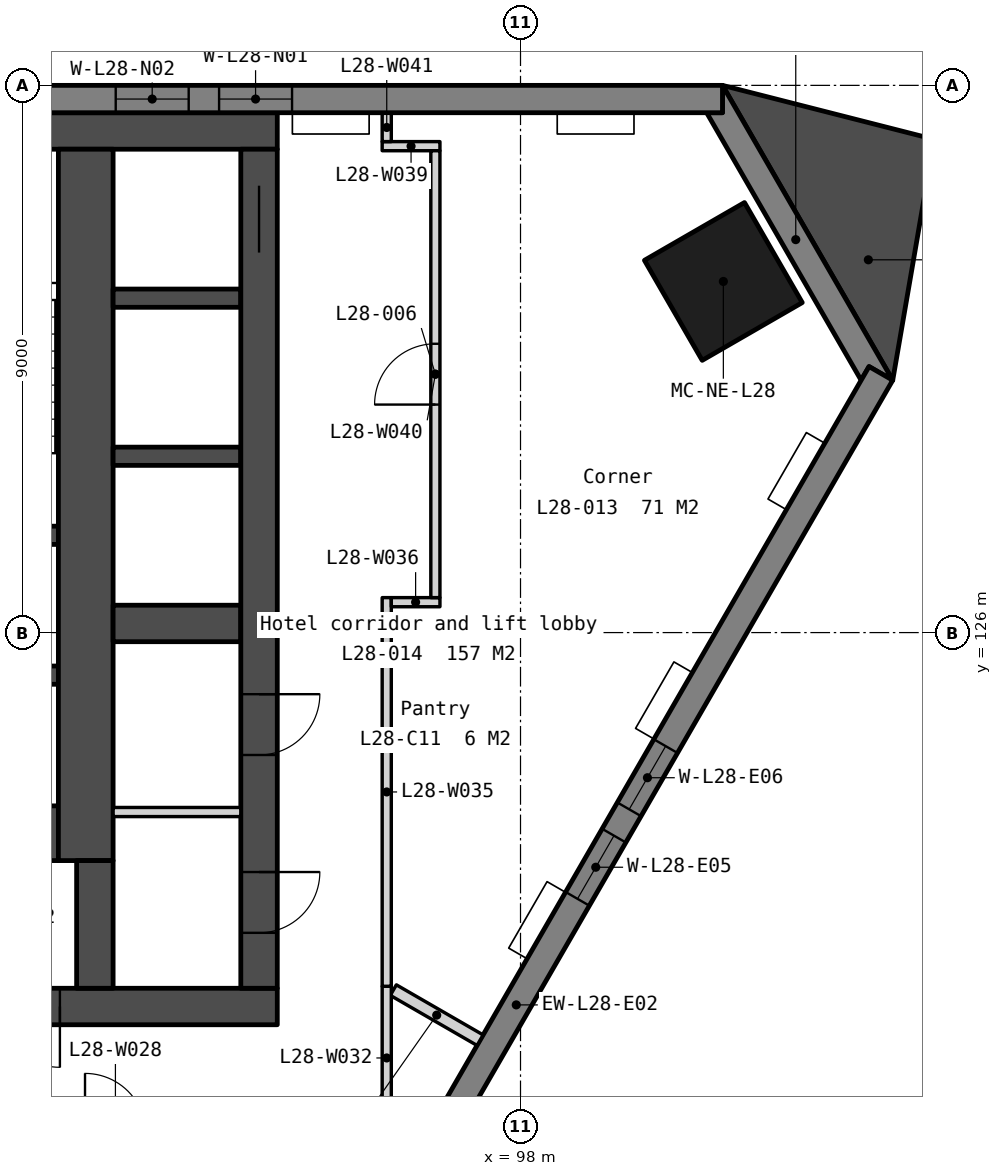
"""IFC4 building model, lengths in metres.
Left out: names, types, materials, properties, quantities, classifications, styles, units other than length and angle.
Written with IfcOpenShell. Run it as: python <this file> out.ifc"""

import sys

from ifc_helpers import new_model, si_unit, direction, frame, frame_2d, origin, origin_2d, place, context, subcontext, project, spatial, polyline, rectangle, outline, extrude, element, fill, save


model = new_model("IFC4")
c1 = context("Model", 3, precision=1e-05, world=origin(), true_north=direction((0.0, 1.0)))
c2 = subcontext(c1, "Body", "Model", "MODEL_VIEW")
j1 = project(units=[si_unit("LENGTHUNIT", "METRE"), si_unit("PLANEANGLEUNIT", "RADIAN")], contexts=[c1])
p1 = place(None, origin())
s1 = spatial("IfcSite", under=j1, at=p1, CompositionType="ELEMENT")
p2 = place(p1, origin())
s2 = spatial("IfcBuilding", under=s1, at=p2, CompositionType="ELEMENT")
p3 = place(p2, frame((0.0, 0.0, 113.3)))
s3 = spatial("IfcBuildingStorey", under=s2, at=p3, CompositionType="ELEMENT", Elevation=113.3)
p4 = place(p3, frame((101.336, 131.775, 0.0), z_axis=(0.0, 0.0, 1.0), x_axis=(-0.5, 0.866025403784, 0.0)))
e1 = element("IfcColumn", 1, at=p4, inside=s3, PredefinedType="COLUMN", context=c2, shape_type="SweptSolid", body=[
    extrude(rectangle(XDim=1.9, YDim=1.9, at=origin_2d()), origin(), (0.0, 0.0, 1.0), 3.5),
])
p5 = place(p3, frame((66.0, 134.25, 0.0), z_axis=(0.0, 0.0, 1.0), x_axis=(1.0, 0.0, 0.0)))
e2 = element("IfcWall", 2, at=p5, inside=s3, PredefinedType="SOLIDWALL", context=c2, shape_type="SweptSolid", body=[
    extrude(rectangle(XDim=28.0, YDim=0.6, at=frame_2d((14.0, 0.0))), origin(), (0.0, 0.0, 1.0), 3.35),
])
p6 = place(p3, frame((66.0, 119.85, 0.0), z_axis=(0.0, 0.0, 1.0), x_axis=(1.0, 0.0, 0.0)))
e3 = element("IfcWall", 3, at=p6, inside=s3, PredefinedType="SOLIDWALL", context=c2, shape_type="SweptSolid", body=[
    extrude(rectangle(XDim=28.0, YDim=0.6, at=frame_2d((14.0, 0.0))), origin(), (0.0, 0.0, 1.0), 3.35),
])
p7 = place(p6, frame((6.825, 0.0, 0.0)))
e4 = element("IfcOpeningElement", 4, at=p7, cuts=e3, PredefinedType="OPENING", context=c2, shape_type="SweptSolid", body=[
    extrude(rectangle(XDim=1.8, YDim=2.1, at=frame_2d((0.9, 1.05))), frame((0.0, 0.31, 0.0), z_axis=(0.0, -1.0, 0.0), x_axis=(1.0, 0.0, 0.0)), (0.0, 0.0, 1.0), 0.62),
])
p8 = place(p6, frame((15.85, 0.0, 0.0)))
e5 = element("IfcOpeningElement", 5, at=p8, cuts=e3, PredefinedType="OPENING", context=c2, shape_type="SweptSolid", body=[
    extrude(rectangle(XDim=1.5, YDim=2.1, at=frame_2d((0.75, 1.05))), frame((0.0, 0.31, 0.0), z_axis=(0.0, -1.0, 0.0), x_axis=(1.0, 0.0, 0.0)), (0.0, 0.0, 1.0), 0.62),
])
p9 = place(p6, frame((19.375, 0.0, 0.0)))
e6 = element("IfcOpeningElement", 6, at=p9, cuts=e3, PredefinedType="OPENING", context=c2, shape_type="SweptSolid", body=[
    extrude(rectangle(XDim=1.8, YDim=2.1, at=frame_2d((0.9, 1.05))), frame((0.0, 0.31, 0.0), z_axis=(0.0, -1.0, 0.0), x_axis=(1.0, 0.0, 0.0)), (0.0, 0.0, 1.0), 0.62),
])
p10 = place(p6, frame((4.425, 0.0, 0.0)))
e7 = element("IfcOpeningElement", 7, at=p10, cuts=e3, PredefinedType="OPENING", context=c2, shape_type="SweptSolid", body=[
    extrude(rectangle(XDim=1.0, YDim=2.1, at=frame_2d((0.5, 1.05))), frame((0.0, 0.31, 0.0), z_axis=(0.0, -1.0, 0.0), x_axis=(1.0, 0.0, 0.0)), (0.0, 0.0, 1.0), 0.62),
])
p11 = place(p6, frame((9.783, 0.0, 0.0)))
e8 = element("IfcOpeningElement", 8, at=p11, cuts=e3, PredefinedType="OPENING", context=c2, shape_type="SweptSolid", body=[
    extrude(rectangle(XDim=1.0, YDim=2.1, at=frame_2d((0.5, 1.05))), frame((0.0, 0.31, 0.0), z_axis=(0.0, -1.0, 0.0), x_axis=(1.0, 0.0, 0.0)), (0.0, 0.0, 1.0), 0.62),
])
p12 = place(p6, frame((11.525, 0.0, 0.0)))
e9 = element("IfcOpeningElement", 9, at=p12, cuts=e3, PredefinedType="OPENING", context=c2, shape_type="SweptSolid", body=[
    extrude(rectangle(XDim=1.0, YDim=2.1, at=frame_2d((0.5, 1.05))), frame((0.0, 0.31, 0.0), z_axis=(0.0, -1.0, 0.0), x_axis=(1.0, 0.0, 0.0)), (0.0, 0.0, 1.0), 0.62),
])
p13 = place(p6, frame((13.658, 0.0, 0.0)))
e10 = element("IfcOpeningElement", 10, at=p13, cuts=e3, PredefinedType="OPENING", context=c2, shape_type="SweptSolid", body=[
    extrude(rectangle(XDim=1.0, YDim=2.1, at=frame_2d((0.5, 1.05))), frame((0.0, 0.31, 0.0), z_axis=(0.0, -1.0, 0.0), x_axis=(1.0, 0.0, 0.0)), (0.0, 0.0, 1.0), 0.62),
])
p14 = place(p6, frame((21.725, 0.0, 0.0)))
e11 = element("IfcOpeningElement", 11, at=p14, cuts=e3, PredefinedType="OPENING", context=c2, shape_type="SweptSolid", body=[
    extrude(rectangle(XDim=1.0, YDim=2.1, at=frame_2d((0.5, 1.05))), frame((0.0, 0.31, 0.0), z_axis=(0.0, -1.0, 0.0), x_axis=(1.0, 0.0, 0.0)), (0.0, 0.0, 1.0), 0.62),
])
p15 = place(p6, frame((23.425, 0.0, 0.0)))
e12 = element("IfcOpeningElement", 12, at=p15, cuts=e3, PredefinedType="OPENING", context=c2, shape_type="SweptSolid", body=[
    extrude(rectangle(XDim=1.0, YDim=2.1, at=frame_2d((0.5, 1.05))), frame((0.0, 0.31, 0.0), z_axis=(0.0, -1.0, 0.0), x_axis=(1.0, 0.0, 0.0)), (0.0, 0.0, 1.0), 0.62),
])
for number, where, z_axis, x_axis in (
    (13, (87.85, 127.6, 0.0), (0.0, 0.0, 1.0), (1.0, 0.0, 0.0)),
    (14, (87.85, 125.3, 0.0), (0.0, 0.0, 1.0), (1.0, 0.0, 0.0)),
):
    element("IfcWall", number, at=place(p3, frame(where, z_axis=z_axis, x_axis=x_axis)), inside=s3, PredefinedType="SOLIDWALL", context=c2, shape_type="SweptSolid", body=[
        extrude(rectangle(XDim=2.55, YDim=0.3, at=frame_2d((1.275, 0.0))), origin(), (0.0, 0.0, 1.0), 3.35),
    ])
p16 = place(p3, frame((87.85, 122.7, 0.0), z_axis=(0.0, 0.0, 1.0), x_axis=(1.0, 0.0, 0.0)))
e15 = element("IfcWall", 15, at=p16, inside=s3, PredefinedType="SOLIDWALL", context=c2, shape_type="SweptSolid", body=[
    extrude(rectangle(XDim=2.55, YDim=0.9, at=frame_2d((1.275, 0.0))), origin(), (0.0, 0.0, 1.0), 3.35),
])
p17 = place(p3, frame((90.85, 133.95, 0.0), z_axis=(0.0, 0.0, 1.0), x_axis=(0.0, -1.0, 0.0)))
e16 = element("IfcWall", 16, at=p17, inside=s3, PredefinedType="SOLIDWALL", context=c2, shape_type="SweptSolid", body=[
    extrude(rectangle(XDim=11.7, YDim=0.9, at=frame_2d((5.85, 0.0))), origin(), (0.0, 0.0, 1.0), 3.35),
])
p18 = place(p3, frame((91.0, 122.25, 0.0), z_axis=(0.0, 0.0, 1.0), x_axis=(0.0, -1.0, 0.0)))
e17 = element("IfcWall", 17, at=p18, inside=s3, PredefinedType="SOLIDWALL", context=c2, shape_type="SweptSolid", body=[
    extrude(rectangle(XDim=2.1, YDim=0.6, at=frame_2d((1.05, 0.0))), origin(), (0.0, 0.0, 1.0), 3.35),
])
for number, where, z_axis, x_axis in (
    (18, (91.3, 131.5, 0.0), (0.0, 0.0, 1.0), (1.0, 0.0, 0.0)),
    (19, (91.3, 128.9, 0.0), (0.0, 0.0, 1.0), (1.0, 0.0, 0.0)),
):
    element("IfcWall", number, at=place(p3, frame(where, z_axis=z_axis, x_axis=x_axis)), inside=s3, PredefinedType="SOLIDWALL", context=c2, shape_type="SweptSolid", body=[
        extrude(rectangle(XDim=2.1, YDim=0.3, at=frame_2d((1.05, 0.0))), origin(), (0.0, 0.0, 1.0), 3.35),
    ])
p19 = place(p3, frame((91.3, 126.15, 0.0), z_axis=(0.0, 0.0, 1.0), x_axis=(1.0, 0.0, 0.0)))
e20 = element("IfcWall", 20, at=p19, inside=s3, PredefinedType="SOLIDWALL", context=c2, shape_type="SweptSolid", body=[
    extrude(rectangle(XDim=2.1, YDim=0.6, at=frame_2d((1.05, 0.0))), origin(), (0.0, 0.0, 1.0), 3.35),
])
p20 = place(p3, frame((91.3, 123.049, 0.0), z_axis=(0.0, 0.0, 1.0), x_axis=(1.0, 0.0, 0.0)))
e21 = element("IfcWall", 21, at=p20, inside=s3, PredefinedType="PARTITIONING", context=c2, shape_type="SweptSolid", body=[
    extrude(rectangle(XDim=2.1, YDim=0.15, at=frame_2d((1.05, 0.0))), origin(), (0.0, 0.0, 1.0), 3.35),
])
p21 = place(p3, frame((93.7, 133.95, 0.0), z_axis=(0.0, 0.0, 1.0), x_axis=(0.0, -1.0, 0.0)))
e22 = element("IfcWall", 22, at=p21, inside=s3, PredefinedType="SOLIDWALL", context=c2, shape_type="SweptSolid", body=[
    extrude(rectangle(XDim=13.8, YDim=0.6, at=frame_2d((6.9, 0.0))), origin(), (0.0, 0.0, 1.0), 3.35),
])
p22 = place(p21, frame((0.6, 0.0, 0.0)))
e23 = element("IfcOpeningElement", 23, at=p22, cuts=e22, PredefinedType="OPENING", context=c2, shape_type="SweptSolid", body=[
    extrude(rectangle(XDim=1.1, YDim=2.1, at=frame_2d((0.55, 1.05))), frame((0.0, 0.31, 0.0), z_axis=(0.0, -1.0, 0.0), x_axis=(1.0, 0.0, 0.0)), (0.0, 0.0, 1.0), 0.62),
])
p23 = place(p21, frame((8.963, 0.0, 0.0)))
e24 = element("IfcOpeningElement", 24, at=p23, cuts=e22, PredefinedType="OPENING", context=c2, shape_type="SweptSolid", body=[
    extrude(rectangle(XDim=1.0, YDim=2.1, at=frame_2d((0.5, 1.05))), frame((0.0, 0.31, 0.0), z_axis=(0.0, -1.0, 0.0), x_axis=(1.0, 0.0, 0.0)), (0.0, 0.0, 1.0), 0.62),
])
p24 = place(p21, frame((11.888, 0.0, 0.0)))
e25 = element("IfcOpeningElement", 25, at=p24, cuts=e22, PredefinedType="OPENING", context=c2, shape_type="SweptSolid", body=[
    extrude(rectangle(XDim=1.0, YDim=2.1, at=frame_2d((0.5, 1.05))), frame((0.0, 0.31, 0.0), z_axis=(0.0, -1.0, 0.0), x_axis=(1.0, 0.0, 0.0)), (0.0, 0.0, 1.0), 0.62),
])
p25 = place(p3, frame((0.0, 0.0, -0.15)))
e26 = element("IfcWall", 26, at=p25, inside=s3, PredefinedType="SOLIDWALL", context=c2, shape_type="SweptSolid", body=[
    extrude(outline(polyline([(104.122, 130.15), (103.732, 130.375), (103.602, 130.15), (101.062, 134.55), (101.322, 134.55), (101.322, 135.0), (104.122, 130.15)])), origin(), (0.0, 0.0, 1.0), 3.5),
])
p26 = place(p3, frame((101.322, 134.775, -0.15), z_axis=(0.0, 0.0, 1.0), x_axis=(-1.0, 0.0, 0.0)))
e27 = element("IfcWall", 27, at=p26, inside=s3, PredefinedType="SOLIDWALL", context=c2, shape_type="SweptSolid", body=[
    extrude(outline(polyline([(42.643, 0.0), (42.643, 3.5), (0.0, 3.5), (0.0, 0.0), (42.643, 0.0)])), frame((0.0, 0.225, 0.0), z_axis=(0.0, -1.0, 0.0), x_axis=(1.0, 0.0, 0.0)), (0.0, 0.0, 1.0), 0.45),
])
p27 = place(p26, frame((7.079, 0.0, 1.05)))
e28 = element("IfcOpeningElement", 28, at=p27, cuts=e27, PredefinedType="OPENING", context=c2, shape_type="SweptSolid", body=[
    extrude(rectangle(XDim=1.2, YDim=1.5, at=frame_2d((0.6, 0.75))), frame((0.0, 0.235, 0.0), z_axis=(0.0, -1.0, 0.0), x_axis=(1.0, 0.0, 0.0)), (0.0, 0.0, 1.0), 0.47),
])
p28 = place(p26, frame((8.779, 0.0, 1.05)))
e29 = element("IfcOpeningElement", 29, at=p28, cuts=e27, PredefinedType="OPENING", context=c2, shape_type="SweptSolid", body=[
    extrude(rectangle(XDim=1.2, YDim=1.5, at=frame_2d((0.6, 0.75))), frame((0.0, 0.235, 0.0), z_axis=(0.0, -1.0, 0.0), x_axis=(1.0, 0.0, 0.0)), (0.0, 0.0, 1.0), 0.47),
])
p29 = place(p26, frame((15.607, 0.0, 1.05)))
e30 = element("IfcOpeningElement", 30, at=p29, cuts=e27, PredefinedType="OPENING", context=c2, shape_type="SweptSolid", body=[
    extrude(rectangle(XDim=1.2, YDim=1.5, at=frame_2d((0.6, 0.75))), frame((0.0, 0.235, 0.0), z_axis=(0.0, -1.0, 0.0), x_axis=(1.0, 0.0, 0.0)), (0.0, 0.0, 1.0), 0.47),
])
p30 = place(p26, frame((17.307, 0.0, 1.05)))
e31 = element("IfcOpeningElement", 31, at=p30, cuts=e27, PredefinedType="OPENING", context=c2, shape_type="SweptSolid", body=[
    extrude(rectangle(XDim=1.2, YDim=1.5, at=frame_2d((0.6, 0.75))), frame((0.0, 0.235, 0.0), z_axis=(0.0, -1.0, 0.0), x_axis=(1.0, 0.0, 0.0)), (0.0, 0.0, 1.0), 0.47),
])
p31 = place(p26, frame((24.136, 0.0, 1.05)))
e32 = element("IfcOpeningElement", 32, at=p31, cuts=e27, PredefinedType="OPENING", context=c2, shape_type="SweptSolid", body=[
    extrude(rectangle(XDim=1.2, YDim=1.5, at=frame_2d((0.6, 0.75))), frame((0.0, 0.235, 0.0), z_axis=(0.0, -1.0, 0.0), x_axis=(1.0, 0.0, 0.0)), (0.0, 0.0, 1.0), 0.47),
])
p32 = place(p26, frame((25.836, 0.0, 1.05)))
e33 = element("IfcOpeningElement", 33, at=p32, cuts=e27, PredefinedType="OPENING", context=c2, shape_type="SweptSolid", body=[
    extrude(rectangle(XDim=1.2, YDim=1.5, at=frame_2d((0.6, 0.75))), frame((0.0, 0.235, 0.0), z_axis=(0.0, -1.0, 0.0), x_axis=(1.0, 0.0, 0.0)), (0.0, 0.0, 1.0), 0.47),
])
p33 = place(p26, frame((32.665, 0.0, 1.05)))
e34 = element("IfcOpeningElement", 34, at=p33, cuts=e27, PredefinedType="OPENING", context=c2, shape_type="SweptSolid", body=[
    extrude(rectangle(XDim=1.2, YDim=1.5, at=frame_2d((0.6, 0.75))), frame((0.0, 0.235, 0.0), z_axis=(0.0, -1.0, 0.0), x_axis=(1.0, 0.0, 0.0)), (0.0, 0.0, 1.0), 0.47),
])
p34 = place(p26, frame((34.365, 0.0, 1.05)))
e35 = element("IfcOpeningElement", 35, at=p34, cuts=e27, PredefinedType="OPENING", context=c2, shape_type="SweptSolid", body=[
    extrude(rectangle(XDim=1.2, YDim=1.5, at=frame_2d((0.6, 0.75))), frame((0.0, 0.235, 0.0), z_axis=(0.0, -1.0, 0.0), x_axis=(1.0, 0.0, 0.0)), (0.0, 0.0, 1.0), 0.47),
])
p35 = place(p3, frame((91.934, 109.49, -0.15), z_axis=(0.0, 0.0, 1.0), x_axis=(0.500002343971, 0.866024050488, 0.0)))
e36 = element("IfcWall", 36, at=p35, inside=s3, PredefinedType="SOLIDWALL", context=c2, shape_type="SweptSolid", body=[
    extrude(outline(polyline([(23.986, 3.5), (23.986, 0.0), (0.0, 0.0), (0.0, 3.5), (23.986, 3.5)])), frame((0.0, 0.225, 0.0), z_axis=(0.0, -1.0, 0.0), x_axis=(1.0, 0.0, 0.0)), (0.0, 0.0, 1.0), 0.45),
])
p36 = place(p35, frame((5.479, 0.0, 1.05)))
e37 = element("IfcOpeningElement", 37, at=p36, cuts=e36, PredefinedType="OPENING", context=c2, shape_type="SweptSolid", body=[
    extrude(rectangle(XDim=1.2, YDim=1.5, at=frame_2d((0.6, 0.75))), frame((0.0, 0.235, 0.0), z_axis=(0.0, -1.0, 0.0), x_axis=(1.0, 0.0, 0.0)), (0.0, 0.0, 1.0), 0.47),
])
p37 = place(p35, frame((7.179, 0.0, 1.05)))
e38 = element("IfcOpeningElement", 38, at=p37, cuts=e36, PredefinedType="OPENING", context=c2, shape_type="SweptSolid", body=[
    extrude(rectangle(XDim=1.2, YDim=1.5, at=frame_2d((0.6, 0.75))), frame((0.0, 0.235, 0.0), z_axis=(0.0, -1.0, 0.0), x_axis=(1.0, 0.0, 0.0)), (0.0, 0.0, 1.0), 0.47),
])
p38 = place(p35, frame((14.007, 0.0, 1.05)))
e39 = element("IfcOpeningElement", 39, at=p38, cuts=e36, PredefinedType="OPENING", context=c2, shape_type="SweptSolid", body=[
    extrude(rectangle(XDim=1.2, YDim=1.5, at=frame_2d((0.6, 0.75))), frame((0.0, 0.235, 0.0), z_axis=(0.0, -1.0, 0.0), x_axis=(1.0, 0.0, 0.0)), (0.0, 0.0, 1.0), 0.47),
])
p39 = place(p35, frame((15.707, 0.0, 1.05)))
e40 = element("IfcOpeningElement", 40, at=p39, cuts=e36, PredefinedType="OPENING", context=c2, shape_type="SweptSolid", body=[
    extrude(rectangle(XDim=1.2, YDim=1.5, at=frame_2d((0.6, 0.75))), frame((0.0, 0.235, 0.0), z_axis=(0.0, -1.0, 0.0), x_axis=(1.0, 0.0, 0.0)), (0.0, 0.0, 1.0), 0.47),
])
p40 = place(p3, frame((0.0, 0.0, -0.15)))
e41 = element("IfcWall", 41, at=p40, inside=s3, PredefinedType="SOLIDWALL", context=c2, shape_type="SweptSolid", body=[
    extrude(outline(polyline([(104.122, 130.15), (104.805, 134.112), (101.322, 135.0), (104.122, 130.15)])), origin(), (0.0, 0.0, 1.0), 3.5),
])
p41 = place(p3, frame((95.908, 120.12, 0.0), z_axis=(0.0, 0.0, 1.0), x_axis=(0.866101713734, -0.499867803992, 0.0)))
e42 = element("IfcWall", 42, at=p41, inside=s3, PredefinedType="PARTITIONING", context=c2, shape_type="SweptSolid", body=[
    extrude(rectangle(XDim=1.648, YDim=0.2, at=frame_2d((0.824, 0.0))), origin(), (0.0, 0.0, 1.0), 3.35),
])
p42 = place(p3, frame((95.8, 117.825, 0.0), z_axis=(0.0, 0.0, 1.0), x_axis=(0.0, 1.0, 0.0)))
e43 = element("IfcWall", 43, at=p42, inside=s3, PredefinedType="PARTITIONING", context=c2, shape_type="SweptSolid", body=[
    extrude(rectangle(XDim=2.358, YDim=0.15, at=frame_2d((1.179, 0.0))), origin(), (0.0, 0.0, 1.0), 3.35),
])
p43 = place(p3, frame((95.8, 120.183, 0.0), z_axis=(0.0, 0.0, 1.0), x_axis=(0.0, 1.0, 0.0)))
e44 = element("IfcWall", 44, at=p43, inside=s3, PredefinedType="PARTITIONING", context=c2, shape_type="SweptSolid", body=[
    extrude(rectangle(XDim=6.392, YDim=0.15, at=frame_2d((3.196, 0.0))), origin(), (0.0, 0.0, 1.0), 3.35),
])
p44 = place(p3, frame((95.875, 126.5, 0.0), z_axis=(0.0, 0.0, 1.0), x_axis=(1.0, 0.0, 0.0)))
e45 = element("IfcWall", 45, at=p44, inside=s3, PredefinedType="PARTITIONING", context=c2, shape_type="SweptSolid", body=[
    extrude(rectangle(XDim=0.8, YDim=0.15, at=frame_2d((0.4, 0.0))), origin(), (0.0, 0.0, 1.0), 3.35),
])
p45 = place(p3, frame((95.725, 134.0, 0.0), z_axis=(0.0, 0.0, 1.0), x_axis=(1.0, 0.0, 0.0)))
e46 = element("IfcWall", 46, at=p45, inside=s3, PredefinedType="PARTITIONING", context=c2, shape_type="SweptSolid", body=[
    extrude(rectangle(XDim=0.95, YDim=0.15, at=frame_2d((0.475, 0.0))), origin(), (0.0, 0.0, 1.0), 2.886),
])
p46 = place(p3, frame((96.6, 126.575, 0.0), z_axis=(0.0, 0.0, 1.0), x_axis=(0.0, 1.0, 0.0)))
e47 = element("IfcWall", 47, at=p46, inside=s3, PredefinedType="PARTITIONING", context=c2, shape_type="SweptSolid", body=[
    extrude(rectangle(XDim=7.35, YDim=0.15, at=frame_2d((3.675, 0.0))), origin(), (0.0, 0.0, 1.0), 3.35),
])
p47 = place(p46, frame((3.175, 0.0, 0.0)))
e48 = element("IfcOpeningElement", 48, at=p47, cuts=e47, PredefinedType="OPENING", context=c2, shape_type="SweptSolid", body=[
    extrude(rectangle(XDim=1.0, YDim=2.1, at=frame_2d((0.5, 1.05))), frame((0.0, 0.085, 0.0), z_axis=(0.0, -1.0, 0.0), x_axis=(1.0, 0.0, 0.0)), (0.0, 0.0, 1.0), 0.17),
])
p48 = place(p3, frame((95.8, 134.075, 0.0), z_axis=(0.0, 0.0, 1.0), x_axis=(0.0, 1.0, 0.0)))
e49 = element("IfcWall", 49, at=p48, inside=s3, PredefinedType="PARTITIONING", context=c2, shape_type="SweptSolid", body=[
    extrude(rectangle(XDim=0.465, YDim=0.15, at=frame_2d((0.232, 0.0))), origin(), (0.0, 0.0, 1.0), 3.35),
])
p49 = place(p22, origin())
e50 = element("IfcDoor", 50, at=p49, inside=s3, OperationType="SLIDING_TO_LEFT", PredefinedType="DOOR", context=c2, shape_type="SweptSolid", body=[
    extrude(rectangle(XDim=1.1, YDim=2.1, at=frame_2d((0.55, 1.05))), frame((0.0, 0.025, 0.0), z_axis=(0.0, -1.0, 0.0), x_axis=(1.0, 0.0, 0.0)), (0.0, 0.0, 1.0), 0.05),
])
fill(e23, e50)
p50 = place(p23, origin())
e51 = element("IfcDoor", 51, at=p50, inside=s3, OperationType="SINGLE_SWING_LEFT", PredefinedType="DOOR", context=c2, shape_type="SweptSolid", body=[
    extrude(rectangle(XDim=1.0, YDim=2.1, at=frame_2d((0.5, 1.05))), frame((0.0, 0.025, 0.0), z_axis=(0.0, -1.0, 0.0), x_axis=(1.0, 0.0, 0.0)), (0.0, 0.0, 1.0), 0.05),
])
fill(e24, e51)
p51 = place(p24, origin())
e52 = element("IfcDoor", 52, at=p51, inside=s3, OperationType="SINGLE_SWING_LEFT", PredefinedType="DOOR", context=c2, shape_type="SweptSolid", body=[
    extrude(rectangle(XDim=1.0, YDim=2.1, at=frame_2d((0.5, 1.05))), frame((0.0, 0.025, 0.0), z_axis=(0.0, -1.0, 0.0), x_axis=(1.0, 0.0, 0.0)), (0.0, 0.0, 1.0), 0.05),
])
fill(e25, e52)
p52 = place(p15, origin())
e53 = element("IfcDoor", 53, at=p52, inside=s3, OperationType="SINGLE_SWING_RIGHT", PredefinedType="DOOR", context=c2, shape_type="SweptSolid", body=[
    extrude(rectangle(XDim=1.0, YDim=2.1, at=frame_2d((0.5, 1.05))), frame((0.0, 0.025, 0.0), z_axis=(0.0, -1.0, 0.0), x_axis=(1.0, 0.0, 0.0)), (0.0, 0.0, 1.0), 0.05),
])
fill(e12, e53)
p53 = place(p27, origin())
e54 = element("IfcWindow", 54, at=p53, inside=s3, PartitioningType="SINGLE_PANEL", PredefinedType="WINDOW", context=c2, shape_type="SweptSolid", body=[
    extrude(rectangle(XDim=1.2, YDim=1.5, at=frame_2d((0.6, 0.75))), frame((0.0, 0.03, 0.0), z_axis=(0.0, -1.0, 0.0), x_axis=(1.0, 0.0, 0.0)), (0.0, 0.0, 1.0), 0.06),
])
fill(e28, e54)
p54 = place(p28, origin())
e55 = element("IfcWindow", 55, at=p54, inside=s3, PartitioningType="SINGLE_PANEL", PredefinedType="WINDOW", context=c2, shape_type="SweptSolid", body=[
    extrude(rectangle(XDim=1.2, YDim=1.5, at=frame_2d((0.6, 0.75))), frame((0.0, 0.03, 0.0), z_axis=(0.0, -1.0, 0.0), x_axis=(1.0, 0.0, 0.0)), (0.0, 0.0, 1.0), 0.06),
])
fill(e29, e55)
p55 = place(p38, origin())
e56 = element("IfcWindow", 56, at=p55, inside=s3, PartitioningType="SINGLE_PANEL", PredefinedType="WINDOW", context=c2, shape_type="SweptSolid", body=[
    extrude(rectangle(XDim=1.2, YDim=1.5, at=frame_2d((0.6, 0.75))), frame((0.0, 0.03, 0.0), z_axis=(0.0, -1.0, 0.0), x_axis=(1.0, 0.0, 0.0)), (0.0, 0.0, 1.0), 0.06),
])
fill(e39, e56)
p56 = place(p39, origin())
e57 = element("IfcWindow", 57, at=p56, inside=s3, PartitioningType="SINGLE_PANEL", PredefinedType="WINDOW", context=c2, shape_type="SweptSolid", body=[
    extrude(rectangle(XDim=1.2, YDim=1.5, at=frame_2d((0.6, 0.75))), frame((0.0, 0.03, 0.0), z_axis=(0.0, -1.0, 0.0), x_axis=(1.0, 0.0, 0.0)), (0.0, 0.0, 1.0), 0.06),
])
fill(e40, e57)
p57 = place(p47, origin())
e58 = element("IfcDoor", 58, at=p57, inside=s3, OperationType="SINGLE_SWING_LEFT", PredefinedType="DOOR", context=c2, shape_type="SweptSolid", body=[
    extrude(rectangle(XDim=1.0, YDim=2.1, at=frame_2d((0.5, 1.05))), frame((0.0, 0.025, 0.0), z_axis=(0.0, -1.0, 0.0), x_axis=(1.0, 0.0, 0.0)), (0.0, 0.0, 1.0), 0.05),
])
fill(e48, e58)
save(model, sys.argv[1])
